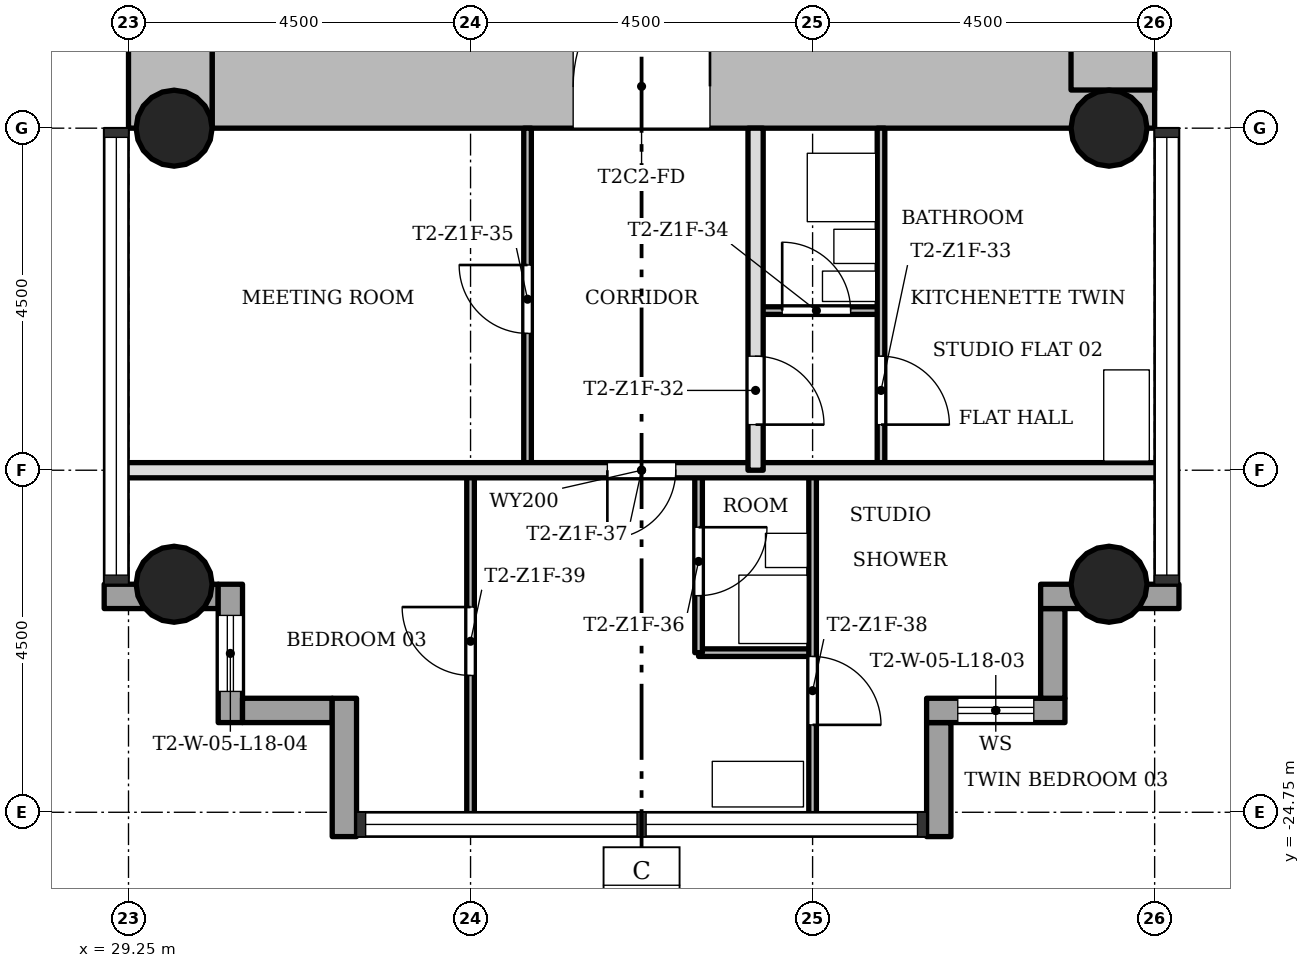
"""IFC4 building model, lengths in metres.
Left out: names, types, materials, properties, quantities, classifications, styles, units other than length and angle.
Written with IfcOpenShell. Run it as: python <this file> out.ifc"""

import sys

from ifc_helpers import new_model, si_unit, direction, frame, frame_2d, origin, origin_2d, place, context, subcontext, project, spatial, rectangle, hollow_circle, extrude, element, fill, save


model = new_model("IFC4")
c1 = context("Model", 3, precision=1e-05, world=origin(), true_north=direction((0.0, 1.0)))
c2 = subcontext(c1, "Body", "Model", "MODEL_VIEW")
j1 = project(units=[si_unit("LENGTHUNIT", "METRE"), si_unit("PLANEANGLEUNIT", "RADIAN")], contexts=[c1])
p1 = place(None, origin())
s1 = spatial("IfcSite", under=j1, at=p1, CompositionType="ELEMENT")
p2 = place(p1, origin())
s2 = spatial("IfcBuilding", under=s1, at=p2, CompositionType="ELEMENT")
p3 = place(p2, frame((0.0, 0.0, 68.7)))
s3 = spatial("IfcBuildingStorey", under=s2, at=p3, CompositionType="ELEMENT", Elevation=68.7)
p4 = place(p3, frame((30.35, -15.2, 0.0), z_axis=(0.0, 0.0, 1.0), x_axis=(1.0, 0.0, 0.0)))
e1 = element("IfcWall", 1, at=p4, inside=s3, PredefinedType="SHEAR", context=c2, shape_type="SweptSolid", body=[
    extrude(rectangle(XDim=12.4, YDim=1.1, at=frame_2d((6.2, 0.0))), origin(), (0.0, 0.0, 1.0), 3.4),
])
p5 = place(p4, frame((4.75, 0.0, 0.0)))
e2 = element("IfcOpeningElement", 2, at=p5, cuts=e1, PredefinedType="OPENING", context=c2, shape_type="SweptSolid", body=[
    extrude(rectangle(XDim=1.8, YDim=2.1, at=frame_2d((0.9, 1.05))), frame((0.0, 0.56, 0.0), z_axis=(0.0, -1.0, 0.0), x_axis=(1.0, 0.0, 0.0)), (0.0, 0.0, 1.0), 1.12),
])
p6 = place(p3, frame((42.2, -15.248, 0.0), z_axis=(0.0, 0.0, 1.0), x_axis=(0.0, 1.0, 0.0)))
e3 = element("IfcWall", 3, at=p6, inside=s3, PredefinedType="SHEAR", context=c2, shape_type="SweptSolid", body=[
    extrude(rectangle(XDim=8.596, YDim=1.1, at=frame_2d((4.298, 0.0))), origin(), (0.0, 0.0, 1.0), 3.4),
])
p7 = place(p3, frame((29.8, -7.85, 0.0), z_axis=(0.0, 0.0, 1.0), x_axis=(0.0, -1.0, 0.0)))
e4 = element("IfcWall", 4, at=p7, inside=s3, PredefinedType="SHEAR", context=c2, shape_type="SweptSolid", body=[
    extrude(rectangle(XDim=7.9, YDim=1.1, at=frame_2d((3.95, 0.0))), origin(), (0.0, 0.0, 1.0), 3.4),
])
for number, where, z_axis, x_axis in (
    (5, (42.15, -15.75, 0.0), (0.0, 0.0, 1.0), (1.0, 0.0, 0.0)),
    (6, (29.85, -15.75, 0.0), (0.0, 0.0, 1.0), (1.0, 0.0, 0.0)),
    (7, (42.15, -21.75, 0.0), (0.0, 0.0, 1.0), (1.0, 0.0, 0.0)),
    (8, (29.85, -21.75, 0.0), (0.0, 0.0, 1.0), (1.0, 0.0, 0.0)),
):
    element("IfcColumn", number, at=place(p3, frame(where, z_axis=z_axis, x_axis=x_axis)), inside=s3, PredefinedType="COLUMN", context=c2, shape_type="SweptSolid", body=[
        extrude(hollow_circle(Radius=0.5, WallThickness=0.036, at=origin_2d()), origin(), (0.0, 0.0, 1.0), 3.4),
    ])
p8 = place(p3, frame((39.91, -25.07, -0.3), z_axis=(0.0, 0.0, 1.0), x_axis=(0.0, 1.0, 0.0)))
e9 = element("IfcWall", 9, at=p8, inside=s3, PredefinedType="STANDARD", context=c2, shape_type="SweptSolid", body=[
    extrude(rectangle(XDim=1.5, YDim=0.32, at=frame_2d((0.75, 0.0))), origin(), (0.0, 0.0, 1.0), 3.4),
])
p9 = place(p3, frame((39.75, -23.41, -0.3), z_axis=(0.0, 0.0, 1.0), x_axis=(1.0, 0.0, 0.0)))
e10 = element("IfcWall", 10, at=p9, inside=s3, PredefinedType="STANDARD", context=c2, shape_type="SweptSolid", body=[
    extrude(rectangle(XDim=1.82, YDim=0.32, at=frame_2d((0.91, 0.0))), origin(), (0.0, 0.0, 1.0), 3.4),
])
p10 = place(p9, frame((0.41, 0.0, 1.2)))
e11 = element("IfcOpeningElement", 11, at=p10, cuts=e10, PredefinedType="OPENING", context=c2, shape_type="SweptSolid", body=[
    extrude(rectangle(XDim=1.0, YDim=1.5, at=frame_2d((0.5, 0.75))), frame((0.0, 0.17, 0.0), z_axis=(0.0, -1.0, 0.0), x_axis=(1.0, 0.0, 0.0)), (0.0, 0.0, 1.0), 0.34),
])
p11 = place(p3, frame((41.41, -23.25, -0.3), z_axis=(0.0, 0.0, 1.0), x_axis=(0.0, 1.0, 0.0)))
e12 = element("IfcWall", 12, at=p11, inside=s3, PredefinedType="STANDARD", context=c2, shape_type="SweptSolid", body=[
    extrude(rectangle(XDim=1.18, YDim=0.32, at=frame_2d((0.59, 0.0))), origin(), (0.0, 0.0, 1.0), 3.4),
])
p12 = place(p3, frame((41.25, -21.91, -0.3), z_axis=(0.0, 0.0, 1.0), x_axis=(1.0, 0.0, 0.0)))
e13 = element("IfcWall", 13, at=p12, inside=s3, PredefinedType="STANDARD", context=c2, shape_type="SweptSolid", body=[
    extrude(rectangle(XDim=1.82, YDim=0.32, at=frame_2d((0.91, 0.0))), origin(), (0.0, 0.0, 1.0), 3.4),
])
p13 = place(p3, frame((28.93, -21.91, -0.3), z_axis=(0.0, 0.0, 1.0), x_axis=(1.0, 0.0, 0.0)))
e14 = element("IfcWall", 14, at=p13, inside=s3, PredefinedType="STANDARD", context=c2, shape_type="SweptSolid", body=[
    extrude(rectangle(XDim=1.5, YDim=0.32, at=frame_2d((0.75, 0.0))), origin(), (0.0, 0.0, 1.0), 3.4),
])
p14 = place(p3, frame((30.59, -21.75, -0.3), z_axis=(0.0, 0.0, 1.0), x_axis=(0.0, -1.0, 0.0)))
e15 = element("IfcWall", 15, at=p14, inside=s3, PredefinedType="STANDARD", context=c2, shape_type="SweptSolid", body=[
    extrude(rectangle(XDim=1.82, YDim=0.32, at=frame_2d((0.91, 0.0))), origin(), (0.0, 0.0, 1.0), 3.4),
])
p15 = place(p14, frame((0.41, 0.0, 1.2)))
e16 = element("IfcOpeningElement", 16, at=p15, cuts=e15, PredefinedType="OPENING", context=c2, shape_type="SweptSolid", body=[
    extrude(rectangle(XDim=1.0, YDim=1.5, at=frame_2d((0.5, 0.75))), frame((0.0, 0.17, 0.0), z_axis=(0.0, -1.0, 0.0), x_axis=(1.0, 0.0, 0.0)), (0.0, 0.0, 1.0), 0.34),
])
p16 = place(p3, frame((30.75, -23.41, -0.3), z_axis=(0.0, 0.0, 1.0), x_axis=(1.0, 0.0, 0.0)))
e17 = element("IfcWall", 17, at=p16, inside=s3, PredefinedType="STANDARD", context=c2, shape_type="SweptSolid", body=[
    extrude(rectangle(XDim=1.18, YDim=0.32, at=frame_2d((0.59, 0.0))), origin(), (0.0, 0.0, 1.0), 3.4),
])
p17 = place(p3, frame((32.09, -23.25, -0.3), z_axis=(0.0, 0.0, 1.0), x_axis=(0.0, -1.0, 0.0)))
e18 = element("IfcWall", 18, at=p17, inside=s3, PredefinedType="STANDARD", context=c2, shape_type="SweptSolid", body=[
    extrude(rectangle(XDim=1.82, YDim=0.32, at=frame_2d((0.91, 0.0))), origin(), (0.0, 0.0, 1.0), 3.4),
])
p18 = place(p3, frame((38.25, -22.65, 0.0), z_axis=(0.0, 0.0, 1.0), x_axis=(-1.0, 0.0, 0.0)))
e19 = element("IfcWall", 19, at=p18, inside=s3, PredefinedType="PARTITIONING", context=c2, shape_type="SweptSolid", body=[
    extrude(rectangle(XDim=1.5, YDim=0.1, at=frame_2d((0.75, 0.0))), origin(), (0.0, 0.0, 1.0), 3.0),
])
p19 = place(p3, frame((42.85, -20.25, 0.0), z_axis=(0.0, 0.0, 1.0), x_axis=(-1.0, 0.0, 0.0)))
e20 = element("IfcWall", 20, at=p19, inside=s3, PredefinedType="SOLIDWALL", context=c2, shape_type="SweptSolid", body=[
    extrude(rectangle(XDim=13.7, YDim=0.2, at=frame_2d((6.85, 0.0))), origin(), (0.0, 0.0, 1.0), 3.0),
])
p20 = place(p19, frame((6.4, 0.0, 0.0)))
e21 = element("IfcOpeningElement", 21, at=p20, cuts=e20, PredefinedType="OPENING", context=c2, shape_type="SweptSolid", body=[
    extrude(rectangle(XDim=0.9, YDim=2.1, at=frame_2d((0.45, 1.05))), frame((0.0, 0.11, 0.0), z_axis=(0.0, -1.0, 0.0), x_axis=(1.0, 0.0, 0.0)), (0.0, 0.0, 1.0), 0.22),
])
p21 = place(p3, frame((39.15, -18.15, 0.0), z_axis=(0.0, 0.0, 1.0), x_axis=(-1.0, 0.0, 0.0)))
e22 = element("IfcWall", 22, at=p21, inside=s3, PredefinedType="PARTITIONING", context=c2, shape_type="SweptSolid", body=[
    extrude(rectangle(XDim=1.65, YDim=0.1, at=frame_2d((0.825, 0.0))), origin(), (0.0, 0.0, 1.0), 3.0),
])
p22 = place(p21, frame((0.4, 0.0, 0.0)))
e23 = element("IfcOpeningElement", 23, at=p22, cuts=e22, PredefinedType="OPENING", context=c2, shape_type="SweptSolid", body=[
    extrude(rectangle(XDim=0.9, YDim=2.1, at=frame_2d((0.45, 1.05))), frame((0.0, 0.06, 0.0), z_axis=(0.0, -1.0, 0.0), x_axis=(1.0, 0.0, 0.0)), (0.0, 0.0, 1.0), 0.12),
])
p23 = place(p3, frame((39.15, -20.25, 0.0), z_axis=(0.0, 0.0, 1.0), x_axis=(0.0, 1.0, 0.0)))
e24 = element("IfcWall", 24, at=p23, inside=s3, PredefinedType="PARTITIONING", context=c2, shape_type="SweptSolid", body=[
    extrude(rectangle(XDim=4.5, YDim=0.1, at=frame_2d((2.25, 0.0))), origin(), (0.0, 0.0, 1.0), 3.0),
])
p24 = place(p23, frame((0.6, 0.0, 0.0)))
e25 = element("IfcOpeningElement", 25, at=p24, cuts=e24, PredefinedType="OPENING", context=c2, shape_type="SweptSolid", body=[
    extrude(rectangle(XDim=0.9, YDim=2.1, at=frame_2d((0.45, 1.05))), frame((0.0, 0.06, 0.0), z_axis=(0.0, -1.0, 0.0), x_axis=(1.0, 0.0, 0.0)), (0.0, 0.0, 1.0), 0.12),
])
p25 = place(p3, frame((38.25, -24.85, 0.0), z_axis=(0.0, 0.0, 1.0), x_axis=(0.0, 1.0, 0.0)))
e26 = element("IfcWall", 26, at=p25, inside=s3, PredefinedType="PARTITIONING", context=c2, shape_type="SweptSolid", body=[
    extrude(rectangle(XDim=4.6, YDim=0.1, at=frame_2d((2.3, 0.0))), origin(), (0.0, 0.0, 1.0), 3.0),
])
p26 = place(p25, frame((1.25, 0.0, 0.0)))
e27 = element("IfcOpeningElement", 27, at=p26, cuts=e26, PredefinedType="OPENING", context=c2, shape_type="SweptSolid", body=[
    extrude(rectangle(XDim=0.9, YDim=2.1, at=frame_2d((0.45, 1.05))), frame((0.0, 0.06, 0.0), z_axis=(0.0, -1.0, 0.0), x_axis=(1.0, 0.0, 0.0)), (0.0, 0.0, 1.0), 0.12),
])
p27 = place(p3, frame((37.5, -20.25, 0.0), z_axis=(0.0, 0.0, 1.0), x_axis=(0.0, 1.0, 0.0)))
e28 = element("IfcWall", 28, at=p27, inside=s3, PredefinedType="SOLIDWALL", context=c2, shape_type="SweptSolid", body=[
    extrude(rectangle(XDim=4.5, YDim=0.2, at=frame_2d((2.25, 0.0))), origin(), (0.0, 0.0, 1.0), 3.0),
])
p28 = place(p27, frame((0.6, 0.0, 0.0)))
e29 = element("IfcOpeningElement", 29, at=p28, cuts=e28, PredefinedType="OPENING", context=c2, shape_type="SweptSolid", body=[
    extrude(rectangle(XDim=0.9, YDim=2.1, at=frame_2d((0.45, 1.05))), frame((0.0, 0.11, 0.0), z_axis=(0.0, -1.0, 0.0), x_axis=(1.0, 0.0, 0.0)), (0.0, 0.0, 1.0), 0.22),
])
p29 = place(p3, frame((36.75, -22.65, 0.0), z_axis=(0.0, 0.0, 1.0), x_axis=(0.0, 1.0, 0.0)))
e30 = element("IfcWall", 30, at=p29, inside=s3, PredefinedType="PARTITIONING", context=c2, shape_type="SweptSolid", body=[
    extrude(rectangle(XDim=2.4, YDim=0.1, at=frame_2d((1.2, 0.0))), origin(), (0.0, 0.0, 1.0), 3.0),
])
p30 = place(p29, frame((0.75, 0.0, 0.0)))
e31 = element("IfcOpeningElement", 31, at=p30, cuts=e30, PredefinedType="OPENING", context=c2, shape_type="SweptSolid", body=[
    extrude(rectangle(XDim=0.9, YDim=2.1, at=frame_2d((0.45, 1.05))), frame((0.0, 0.06, 0.0), z_axis=(0.0, -1.0, 0.0), x_axis=(1.0, 0.0, 0.0)), (0.0, 0.0, 1.0), 0.12),
])
p31 = place(p3, frame((34.5, -20.25, 0.0), z_axis=(0.0, 0.0, 1.0), x_axis=(0.0, 1.0, 0.0)))
e32 = element("IfcWall", 32, at=p31, inside=s3, PredefinedType="PARTITIONING", context=c2, shape_type="SweptSolid", body=[
    extrude(rectangle(XDim=4.5, YDim=0.1, at=frame_2d((2.25, 0.0))), origin(), (0.0, 0.0, 1.0), 3.0),
])
p32 = place(p31, frame((1.8, 0.0, 0.0)))
e33 = element("IfcOpeningElement", 33, at=p32, cuts=e32, PredefinedType="OPENING", context=c2, shape_type="SweptSolid", body=[
    extrude(rectangle(XDim=0.9, YDim=2.1, at=frame_2d((0.45, 1.05))), frame((0.0, 0.06, 0.0), z_axis=(0.0, -1.0, 0.0), x_axis=(1.0, 0.0, 0.0)), (0.0, 0.0, 1.0), 0.12),
])
p33 = place(p3, frame((33.75, -24.85, 0.0), z_axis=(0.0, 0.0, 1.0), x_axis=(0.0, 1.0, 0.0)))
e34 = element("IfcWall", 34, at=p33, inside=s3, PredefinedType="PARTITIONING", context=c2, shape_type="SweptSolid", body=[
    extrude(rectangle(XDim=4.6, YDim=0.1, at=frame_2d((2.3, 0.0))), origin(), (0.0, 0.0, 1.0), 3.0),
])
p34 = place(p33, frame((1.9, 0.0, 0.0)))
e35 = element("IfcOpeningElement", 35, at=p34, cuts=e34, PredefinedType="OPENING", context=c2, shape_type="SweptSolid", body=[
    extrude(rectangle(XDim=0.9, YDim=2.1, at=frame_2d((0.45, 1.05))), frame((0.0, 0.06, 0.0), z_axis=(0.0, -1.0, 0.0), x_axis=(1.0, 0.0, 0.0)), (0.0, 0.0, 1.0), 0.12),
])
p35 = place(p28, origin())
e36 = element("IfcDoor", 36, at=p35, inside=s3, OperationType="SINGLE_SWING_LEFT", PredefinedType="DOOR", context=c2, shape_type="SweptSolid", body=[
    extrude(rectangle(XDim=0.9, YDim=2.1, at=frame_2d((0.45, 1.05))), frame((0.0, 0.025, 0.0), z_axis=(0.0, -1.0, 0.0), x_axis=(1.0, 0.0, 0.0)), (0.0, 0.0, 1.0), 0.05),
])
fill(e29, e36)
p36 = place(p24, origin())
e37 = element("IfcDoor", 37, at=p36, inside=s3, OperationType="SINGLE_SWING_LEFT", PredefinedType="DOOR", context=c2, shape_type="SweptSolid", body=[
    extrude(rectangle(XDim=0.9, YDim=2.1, at=frame_2d((0.45, 1.05))), frame((0.0, 0.025, 0.0), z_axis=(0.0, -1.0, 0.0), x_axis=(1.0, 0.0, 0.0)), (0.0, 0.0, 1.0), 0.05),
])
fill(e25, e37)
p37 = place(p22, origin())
e38 = element("IfcDoor", 38, at=p37, inside=s3, OperationType="SINGLE_SWING_RIGHT", PredefinedType="DOOR", context=c2, shape_type="SweptSolid", body=[
    extrude(rectangle(XDim=0.9, YDim=2.1, at=frame_2d((0.45, 1.05))), frame((0.0, 0.025, 0.0), z_axis=(0.0, -1.0, 0.0), x_axis=(1.0, 0.0, 0.0)), (0.0, 0.0, 1.0), 0.05),
])
fill(e23, e38)
p38 = place(p32, origin())
e39 = element("IfcDoor", 39, at=p38, inside=s3, OperationType="SINGLE_SWING_LEFT", PredefinedType="DOOR", context=c2, shape_type="SweptSolid", body=[
    extrude(rectangle(XDim=0.9, YDim=2.1, at=frame_2d((0.45, 1.05))), frame((0.0, 0.025, 0.0), z_axis=(0.0, -1.0, 0.0), x_axis=(1.0, 0.0, 0.0)), (0.0, 0.0, 1.0), 0.05),
])
fill(e33, e39)
p39 = place(p30, origin())
e40 = element("IfcDoor", 40, at=p39, inside=s3, OperationType="SINGLE_SWING_RIGHT", PredefinedType="DOOR", context=c2, shape_type="SweptSolid", body=[
    extrude(rectangle(XDim=0.9, YDim=2.1, at=frame_2d((0.45, 1.05))), frame((0.0, 0.025, 0.0), z_axis=(0.0, -1.0, 0.0), x_axis=(1.0, 0.0, 0.0)), (0.0, 0.0, 1.0), 0.05),
])
fill(e31, e40)
p40 = place(p20, origin())
e41 = element("IfcDoor", 41, at=p40, inside=s3, OperationType="SINGLE_SWING_LEFT", PredefinedType="DOOR", context=c2, shape_type="SweptSolid", body=[
    extrude(rectangle(XDim=0.9, YDim=2.1, at=frame_2d((0.45, 1.05))), frame((0.0, 0.025, 0.0), z_axis=(0.0, -1.0, 0.0), x_axis=(1.0, 0.0, 0.0)), (0.0, 0.0, 1.0), 0.05),
])
fill(e21, e41)
p41 = place(p26, origin())
e42 = element("IfcDoor", 42, at=p41, inside=s3, OperationType="SINGLE_SWING_LEFT", PredefinedType="DOOR", context=c2, shape_type="SweptSolid", body=[
    extrude(rectangle(XDim=0.9, YDim=2.1, at=frame_2d((0.45, 1.05))), frame((0.0, 0.025, 0.0), z_axis=(0.0, -1.0, 0.0), x_axis=(1.0, 0.0, 0.0)), (0.0, 0.0, 1.0), 0.05),
])
fill(e27, e42)
p42 = place(p34, origin())
e43 = element("IfcDoor", 43, at=p42, inside=s3, OperationType="SINGLE_SWING_LEFT", PredefinedType="DOOR", context=c2, shape_type="SweptSolid", body=[
    extrude(rectangle(XDim=0.9, YDim=2.1, at=frame_2d((0.45, 1.05))), frame((0.0, 0.025, 0.0), z_axis=(0.0, -1.0, 0.0), x_axis=(1.0, 0.0, 0.0)), (0.0, 0.0, 1.0), 0.05),
])
fill(e35, e43)
p43 = place(p5, origin())
e44 = element("IfcDoor", 44, at=p43, inside=s3, OperationType="SINGLE_SWING_LEFT", PredefinedType="DOOR", context=c2, shape_type="SweptSolid", body=[
    extrude(rectangle(XDim=1.8, YDim=2.1, at=frame_2d((0.9, 1.05))), frame((0.0, 0.025, 0.0), z_axis=(0.0, -1.0, 0.0), x_axis=(1.0, 0.0, 0.0)), (0.0, 0.0, 1.0), 0.05),
])
fill(e2, e44)
p44 = place(p10, origin())
e45 = element("IfcWindow", 45, at=p44, inside=s3, PartitioningType="SINGLE_PANEL", PredefinedType="WINDOW", context=c2, shape_type="SweptSolid", body=[
    extrude(rectangle(XDim=1.0, YDim=1.5, at=frame_2d((0.5, 0.75))), frame((0.0, 0.03, 0.0), z_axis=(0.0, -1.0, 0.0), x_axis=(1.0, 0.0, 0.0)), (0.0, 0.0, 1.0), 0.06),
])
fill(e11, e45)
p45 = place(p15, origin())
e46 = element("IfcWindow", 46, at=p45, inside=s3, PartitioningType="SINGLE_PANEL", PredefinedType="WINDOW", context=c2, shape_type="SweptSolid", body=[
    extrude(rectangle(XDim=1.0, YDim=1.5, at=frame_2d((0.5, 0.75))), frame((0.0, 0.03, 0.0), z_axis=(0.0, -1.0, 0.0), x_axis=(1.0, 0.0, 0.0)), (0.0, 0.0, 1.0), 0.06),
])
fill(e16, e46)
save(model, sys.argv[1])
